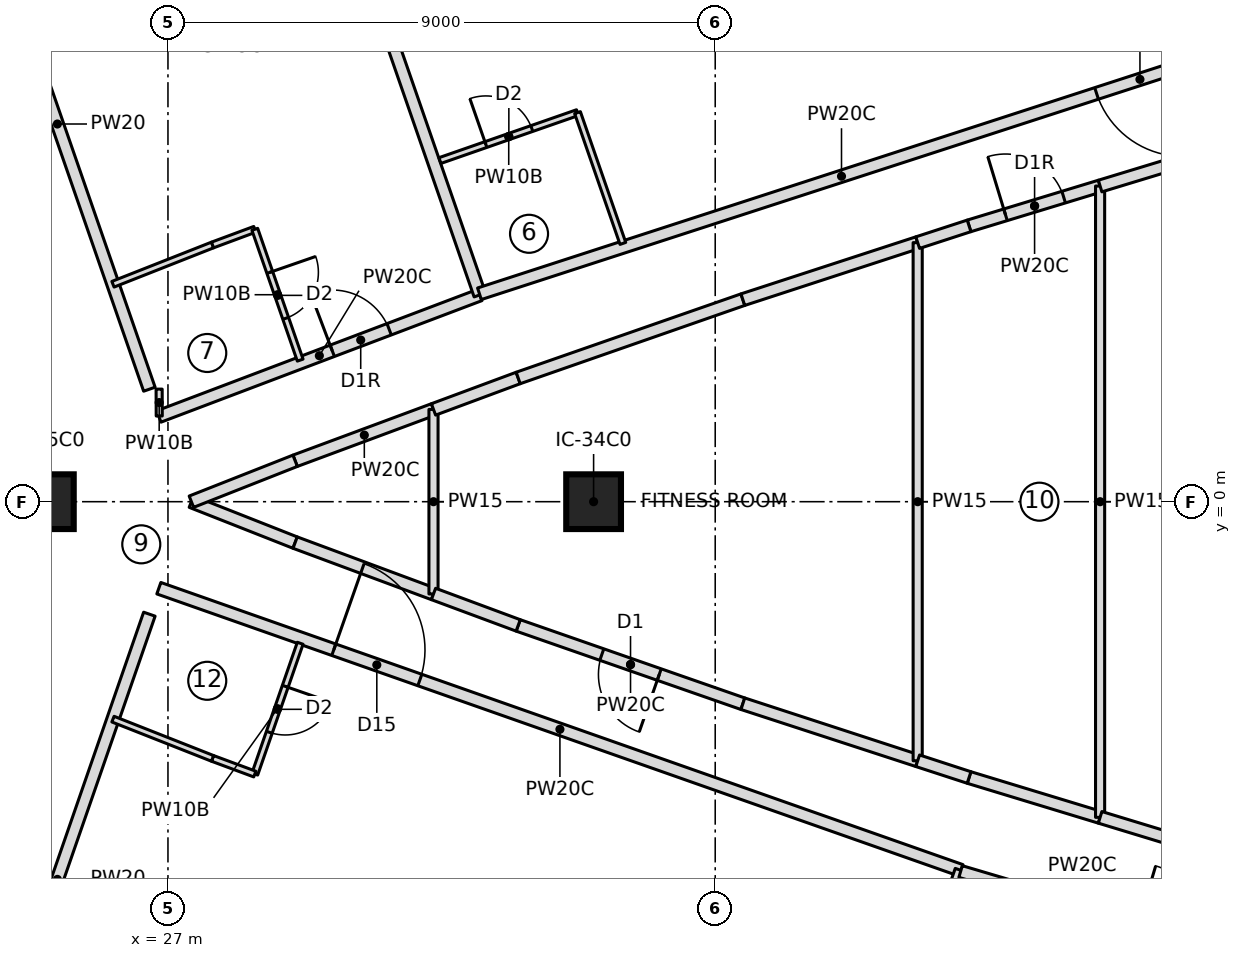
"""IFC4 building model, lengths in metres.
Left out: names, types, materials, properties, quantities, classifications, styles, units other than length and angle.
Written with IfcOpenShell. Run it as: python <this file> out.ifc"""

import sys

from ifc_helpers import new_model, si_unit, direction, frame, frame_2d, origin, origin_2d, place, context, subcontext, project, spatial, rectangle, extrude, element, fill, save


model = new_model("IFC4")
c1 = context("Model", 3, precision=1e-05, world=origin(), true_north=direction((0.0, 1.0)))
c2 = subcontext(c1, "Body", "Model", "MODEL_VIEW")
j1 = project(units=[si_unit("LENGTHUNIT", "METRE"), si_unit("PLANEANGLEUNIT", "RADIAN")], contexts=[c1])
p1 = place(None, origin())
s1 = spatial("IfcSite", under=j1, at=p1, CompositionType="ELEMENT")
p2 = place(p1, origin())
s2 = spatial("IfcBuilding", under=s1, at=p2, CompositionType="ELEMENT")
p3 = place(p2, frame((0.0, 0.0, 271.45)))
s3 = spatial("IfcBuildingStorey", under=s2, at=p3, CompositionType="ELEMENT", Elevation=271.45)
for number, where, z_axis, x_axis in (
    (1, (25.0, 0.0, 0.0), (0.0, 0.0, 1.0), (1.0, 0.0, 0.0)),
    (2, (34.0, 0.0, 0.0), (0.0, 0.0, 1.0), (1.0, 0.0, 0.0)),
):
    element("IfcColumn", number, at=place(p3, frame(where, z_axis=z_axis, x_axis=x_axis)), inside=s3, PredefinedType="COLUMN", context=c2, shape_type="SweptSolid", body=[
        extrude(rectangle(XDim=0.9, YDim=0.9, at=origin_2d()), origin(), (0.0, 0.0, 1.0), 3.55),
    ])
p4 = place(p3, frame((26.694, 1.85, 0.0), z_axis=(0.0, 0.0, 1.0), x_axis=(-0.327714422317, 0.944776829418, 0.0)))
e3 = element("IfcWall", 3, at=p4, inside=s3, PredefinedType="PARTITIONING", context=c2, shape_type="SweptSolid", body=[
    extrude(rectangle(XDim=9.233, YDim=0.2, at=frame_2d((4.617, 0.0))), origin(), (0.0, 0.0, 1.0), 3.25),
])
p5 = place(p3, frame((26.85, 1.401, 0.0), z_axis=(0.0, 0.0, 1.0), x_axis=(0.935181367748, 0.354169181912, 0.0)))
e4 = element("IfcWall", 4, at=p5, inside=s3, PredefinedType="PARTITIONING", context=c2, shape_type="SweptSolid", body=[
    extrude(rectangle(XDim=5.645, YDim=0.2, at=frame_2d((2.823, 0.0))), origin(), (0.0, 0.0, 1.0), 3.25),
])
p6 = place(p5, frame((3.05, 0.0, 0.0)))
e5 = element("IfcOpeningElement", 5, at=p6, cuts=e4, PredefinedType="OPENING", context=c2, shape_type="SweptSolid", body=[
    extrude(rectangle(XDim=1.0, YDim=2.1, at=frame_2d((0.5, 1.05))), frame((0.0, 0.11, 0.0), z_axis=(0.0, -1.0, 0.0), x_axis=(1.0, 0.0, 0.0)), (0.0, 0.0, 1.0), 0.22),
])
p7 = place(p3, frame((26.096, 3.576, 0.0), z_axis=(0.0, 0.0, 1.0), x_axis=(0.930254925629, 0.366913850028, 0.0)))
e6 = element("IfcWall", 6, at=p7, inside=s3, PredefinedType="PARTITIONING", context=c2, shape_type="SweptSolid", body=[
    extrude(rectangle(XDim=1.76, YDim=0.1, at=frame_2d((0.88, 0.0))), origin(), (0.0, 0.0, 1.0), 3.25),
])
p8 = place(p3, frame((27.733, 4.222, 0.0), z_axis=(0.0, 0.0, 1.0), x_axis=(0.937514267289, 0.347946833049, 0.0)))
e7 = element("IfcWall", 7, at=p8, inside=s3, PredefinedType="PARTITIONING", context=c2, shape_type="SweptSolid", body=[
    extrude(rectangle(XDim=0.742, YDim=0.1, at=frame_2d((0.371, 0.0))), origin(), (0.0, 0.0, 1.0), 3.25),
])
p9 = place(p3, frame((28.428, 4.48, 0.0), z_axis=(0.0, 0.0, 1.0), x_axis=(0.327718024288, -0.944775579996, 0.0)))
e8 = element("IfcWall", 8, at=p9, inside=s3, PredefinedType="PARTITIONING", context=c2, shape_type="SweptSolid", body=[
    extrude(rectangle(XDim=2.277, YDim=0.1, at=frame_2d((1.139, 0.0))), origin(), (0.0, 0.0, 1.0), 3.25),
])
p10 = place(p9, frame((0.75, 0.0, 0.0)))
e9 = element("IfcOpeningElement", 9, at=p10, cuts=e8, PredefinedType="OPENING", context=c2, shape_type="SweptSolid", body=[
    extrude(rectangle(XDim=0.8, YDim=2.1, at=frame_2d((0.4, 1.05))), frame((0.0, 0.06, 0.0), z_axis=(0.0, -1.0, 0.0), x_axis=(1.0, 0.0, 0.0)), (0.0, 0.0, 1.0), 0.12),
])
p11 = place(p3, frame((32.129, 3.401, 0.0), z_axis=(0.0, 0.0, 1.0), x_axis=(-0.327724115377, 0.944773467134, 0.0)))
e10 = element("IfcWall", 10, at=p11, inside=s3, PredefinedType="PARTITIONING", context=c2, shape_type="SweptSolid", body=[
    extrude(rectangle(XDim=9.702, YDim=0.2, at=frame_2d((4.851, 0.0))), origin(), (0.0, 0.0, 1.0), 3.25),
])
p12 = place(p3, frame((44.031, 7.286, 0.0), z_axis=(0.0, 0.0, 1.0), x_axis=(-0.951130603276, -0.308788885019, 0.0)))
e11 = element("IfcWall", 11, at=p12, inside=s3, PredefinedType="PARTITIONING", context=c2, shape_type="SweptSolid", body=[
    extrude(rectangle(XDim=12.521, YDim=0.2, at=frame_2d((6.26, 0.0))), origin(), (0.0, 0.0, 1.0), 3.25),
])
p13 = place(p12, frame((0.35, 0.0, 0.0)))
e12 = element("IfcOpeningElement", 12, at=p13, cuts=e11, PredefinedType="OPENING", context=c2, shape_type="SweptSolid", body=[
    extrude(rectangle(XDim=1.5, YDim=2.1, at=frame_2d((0.75, 1.05))), frame((0.0, 0.11, 0.0), z_axis=(0.0, -1.0, 0.0), x_axis=(1.0, 0.0, 0.0)), (0.0, 0.0, 1.0), 0.22),
])
p14 = place(p3, frame((31.473, 5.611, 0.0), z_axis=(0.0, 0.0, 1.0), x_axis=(0.944305532659, 0.329069994059, 0.0)))
e13 = element("IfcWall", 13, at=p14, inside=s3, PredefinedType="PARTITIONING", context=c2, shape_type="SweptSolid", body=[
    extrude(rectangle(XDim=2.396, YDim=0.1, at=frame_2d((1.198, 0.0))), origin(), (0.0, 0.0, 1.0), 3.25),
])
p15 = place(p14, frame((0.8, 0.0, 0.0)))
e14 = element("IfcOpeningElement", 14, at=p15, cuts=e13, PredefinedType="OPENING", context=c2, shape_type="SweptSolid", body=[
    extrude(rectangle(XDim=0.8, YDim=2.1, at=frame_2d((0.4, 1.05))), frame((0.0, 0.06, 0.0), z_axis=(0.0, -1.0, 0.0), x_axis=(1.0, 0.0, 0.0)), (0.0, 0.0, 1.0), 0.12),
])
p16 = place(p3, frame((33.735, 6.399, 0.0), z_axis=(0.0, 0.0, 1.0), x_axis=(0.32768871219, -0.944785747089, 0.0)))
e15 = element("IfcWall", 15, at=p16, inside=s3, PredefinedType="PARTITIONING", context=c2, shape_type="SweptSolid", body=[
    extrude(rectangle(XDim=2.277, YDim=0.1, at=frame_2d((1.138, 0.0))), origin(), (0.0, 0.0, 1.0), 3.25),
])
p17 = place(p3, frame((44.038, 7.267, 0.0), z_axis=(0.0, 0.0, 1.0), x_axis=(-0.327714576096, 0.944776776077, 0.0)))
e16 = element("IfcWall", 16, at=p17, inside=s3, PredefinedType="PARTITIONING", context=c2, shape_type="SweptSolid", body=[
    extrude(rectangle(XDim=9.717, YDim=0.2, at=frame_2d((4.858, 0.0))), origin(), (0.0, 0.0, 1.0), 3.25),
])
p18 = place(p3, frame((23.668, -10.573, 0.0), z_axis=(0.0, 0.0, 1.0), x_axis=(0.327714422317, 0.944776829418, 0.0)))
e17 = element("IfcWall", 17, at=p18, inside=s3, PredefinedType="PARTITIONING", context=c2, shape_type="SweptSolid", body=[
    extrude(rectangle(XDim=9.233, YDim=0.2, at=frame_2d((4.617, 0.0))), origin(), (0.0, 0.0, 1.0), 3.25),
])
p19 = place(p3, frame((26.85, -1.423, 0.0), z_axis=(0.0, 0.0, 1.0), x_axis=(0.943328585164, -0.331860182022, 0.0)))
e18 = element("IfcWall", 18, at=p19, inside=s3, PredefinedType="PARTITIONING", context=c2, shape_type="SweptSolid", body=[
    extrude(rectangle(XDim=13.984, YDim=0.2, at=frame_2d((6.992, 0.0))), origin(), (0.0, 0.0, 1.0), 3.25),
])
p20 = place(p19, frame((3.05, 0.0, 0.0)))
e19 = element("IfcOpeningElement", 19, at=p20, cuts=e18, PredefinedType="OPENING", context=c2, shape_type="SweptSolid", body=[
    extrude(rectangle(XDim=1.5, YDim=2.1, at=frame_2d((0.75, 1.05))), frame((0.0, 0.11, 0.0), z_axis=(0.0, -1.0, 0.0), x_axis=(1.0, 0.0, 0.0)), (0.0, 0.0, 1.0), 0.22),
])
p21 = place(p3, frame((29.175, -2.328, 0.0), z_axis=(0.0, 0.0, 1.0), x_axis=(-0.327718024288, -0.944775579996, 0.0)))
e20 = element("IfcWall", 20, at=p21, inside=s3, PredefinedType="PARTITIONING", context=c2, shape_type="SweptSolid", body=[
    extrude(rectangle(XDim=2.277, YDim=0.1, at=frame_2d((1.139, 0.0))), origin(), (0.0, 0.0, 1.0), 3.25),
])
p22 = place(p21, frame((0.75, 0.0, 0.0)))
e21 = element("IfcOpeningElement", 21, at=p22, cuts=e20, PredefinedType="OPENING", context=c2, shape_type="SweptSolid", body=[
    extrude(rectangle(XDim=0.8, YDim=2.1, at=frame_2d((0.4, 1.05))), frame((0.0, 0.06, 0.0), z_axis=(0.0, -1.0, 0.0), x_axis=(1.0, 0.0, 0.0)), (0.0, 0.0, 1.0), 0.12),
])
p23 = place(p3, frame((28.428, -4.48, 0.0), z_axis=(0.0, 0.0, 1.0), x_axis=(-0.937514267289, 0.347946833049, 0.0)))
e22 = element("IfcWall", 22, at=p23, inside=s3, PredefinedType="PARTITIONING", context=c2, shape_type="SweptSolid", body=[
    extrude(rectangle(XDim=0.742, YDim=0.1, at=frame_2d((0.371, 0.0))), origin(), (0.0, 0.0, 1.0), 3.25),
])
p24 = place(p3, frame((27.733, -4.222, 0.0), z_axis=(0.0, 0.0, 1.0), x_axis=(-0.930254925629, 0.366913850028, 0.0)))
e23 = element("IfcWall", 23, at=p24, inside=s3, PredefinedType="PARTITIONING", context=c2, shape_type="SweptSolid", body=[
    extrude(rectangle(XDim=1.76, YDim=0.1, at=frame_2d((0.88, 0.0))), origin(), (0.0, 0.0, 1.0), 3.25),
])
p25 = place(p3, frame((36.861, -15.235, 0.0), z_axis=(0.0, 0.0, 1.0), x_axis=(0.327710853631, 0.944778067279, 0.0)))
e24 = element("IfcWall", 24, at=p25, inside=s3, PredefinedType="PARTITIONING", context=c2, shape_type="SweptSolid", body=[
    extrude(rectangle(XDim=9.707, YDim=0.2, at=frame_2d((4.854, 0.0))), origin(), (0.0, 0.0, 1.0), 3.25),
])
p26 = place(p3, frame((40.035, -6.083, 0.0), z_axis=(0.0, 0.0, 1.0), x_axis=(0.958901312153, -0.283739799027, 0.0)))
e25 = element("IfcWall", 25, at=p26, inside=s3, PredefinedType="PARTITIONING", context=c2, shape_type="SweptSolid", body=[
    extrude(rectangle(XDim=4.174, YDim=0.2, at=frame_2d((2.087, 0.0))), origin(), (0.0, 0.0, 1.0), 3.25),
])
p27 = place(p26, frame((3.05, 0.0, 0.0)))
e26 = element("IfcOpeningElement", 26, at=p27, cuts=e25, PredefinedType="OPENING", context=c2, shape_type="SweptSolid", body=[
    extrude(rectangle(XDim=1.0, YDim=2.1, at=frame_2d((0.5, 1.05))), frame((0.0, 0.11, 0.0), z_axis=(0.0, -1.0, 0.0), x_axis=(1.0, 0.0, 0.0)), (0.0, 0.0, 1.0), 0.22),
])
p28 = place(p3, frame((29.092, 0.673, 0.0), z_axis=(0.0, 0.0, 1.0), x_axis=(0.937481542944, 0.348034993411, 0.0)))
e27 = element("IfcWall", 27, at=p28, inside=s3, PredefinedType="PARTITIONING", context=c2, shape_type="SweptSolid", body=[
    extrude(rectangle(XDim=2.427, YDim=0.2, at=frame_2d((1.214, 0.0))), origin(), (0.0, 0.0, 1.0), 3.25),
])
for number, where, z_axis, x_axis in (
    (28, (29.092, -0.673, 0.0), (0.0, 0.0, 1.0), (-0.93, 0.367, 0.0)),
    (29, (27.385, 0.0, 0.0), (0.0, 0.0, 1.0), (0.93, 0.367, 0.0)),
):
    element("IfcWall", number, at=place(p3, frame(where, z_axis=z_axis, x_axis=x_axis)), inside=s3, PredefinedType="PARTITIONING", context=c2, shape_type="SweptSolid", body=[
        extrude(rectangle(XDim=1.834, YDim=0.2, at=frame_2d((0.917, 0.0))), origin(), (0.0, 0.0, 1.0), 3.25),
    ])
p29 = place(p3, frame((31.367, -1.518, 0.0), z_axis=(0.0, 0.0, 1.0), x_axis=(-0.937481542944, 0.348034993411, 0.0)))
e30 = element("IfcWall", 30, at=p29, inside=s3, PredefinedType="PARTITIONING", context=c2, shape_type="SweptSolid", body=[
    extrude(rectangle(XDim=2.427, YDim=0.2, at=frame_2d((1.214, 0.0))), origin(), (0.0, 0.0, 1.0), 3.25),
])
p30 = place(p3, frame((31.367, -1.518, 0.0), z_axis=(0.0, 0.0, 1.0), x_axis=(0.0, 1.0, 0.0)))
e31 = element("IfcWall", 31, at=p30, inside=s3, PredefinedType="PARTITIONING", context=c2, shape_type="SweptSolid", body=[
    extrude(rectangle(XDim=3.035, YDim=0.15, at=frame_2d((1.518, 0.0))), origin(), (0.0, 0.0, 1.0), 3.25),
])
p31 = place(p3, frame((36.455, -3.323, 0.0), z_axis=(0.0, 0.0, 1.0), x_axis=(-0.944283635062, 0.329132825093, 0.0)))
e32 = element("IfcWall", 32, at=p31, inside=s3, PredefinedType="PARTITIONING", context=c2, shape_type="SweptSolid", body=[
    extrude(rectangle(XDim=3.913, YDim=0.2, at=frame_2d((1.957, 0.0))), origin(), (0.0, 0.0, 1.0), 3.25),
])
p32 = place(p31, frame((1.457, 0.0, 0.0)))
e33 = element("IfcOpeningElement", 33, at=p32, cuts=e32, PredefinedType="OPENING", context=c2, shape_type="SweptSolid", body=[
    extrude(rectangle(XDim=1.0, YDim=2.1, at=frame_2d((0.5, 1.05))), frame((0.0, 0.11, 0.0), z_axis=(0.0, -1.0, 0.0), x_axis=(1.0, 0.0, 0.0)), (0.0, 0.0, 1.0), 0.22),
])
p33 = place(p3, frame((39.33, -4.26, 0.0), z_axis=(0.0, 0.0, 1.0), x_axis=(-0.95070604111, 0.310093572003, 0.0)))
e34 = element("IfcWall", 34, at=p33, inside=s3, PredefinedType="PARTITIONING", context=c2, shape_type="SweptSolid", body=[
    extrude(rectangle(XDim=3.024, YDim=0.2, at=frame_2d((1.512, 0.0))), origin(), (0.0, 0.0, 1.0), 3.25),
])
for number, where, z_axis, x_axis in (
    (35, (32.76, -2.035, 0.0), (0.0, 0.0, 1.0), (-0.937, 0.348, 0.0)),
    (36, (31.367, 1.518, 0.0), (0.0, 0.0, 1.0), (0.937, 0.348, 0.0)),
):
    element("IfcWall", number, at=place(p3, frame(where, z_axis=z_axis, x_axis=x_axis)), inside=s3, PredefinedType="PARTITIONING", context=c2, shape_type="SweptSolid", body=[
        extrude(rectangle(XDim=1.486, YDim=0.2, at=frame_2d((0.743, 0.0))), origin(), (0.0, 0.0, 1.0), 3.25),
    ])
p34 = place(p3, frame((32.76, 2.035, 0.0), z_axis=(0.0, 0.0, 1.0), x_axis=(0.944283635062, 0.329132825093, 0.0)))
e37 = element("IfcWall", 37, at=p34, inside=s3, PredefinedType="PARTITIONING", context=c2, shape_type="SweptSolid", body=[
    extrude(rectangle(XDim=3.913, YDim=0.2, at=frame_2d((1.957, 0.0))), origin(), (0.0, 0.0, 1.0), 3.25),
])
p35 = place(p3, frame((36.455, 3.323, 0.0), z_axis=(0.0, 0.0, 1.0), x_axis=(0.95070604111, 0.310093572003, 0.0)))
e38 = element("IfcWall", 38, at=p35, inside=s3, PredefinedType="PARTITIONING", context=c2, shape_type="SweptSolid", body=[
    extrude(rectangle(XDim=3.024, YDim=0.2, at=frame_2d((1.512, 0.0))), origin(), (0.0, 0.0, 1.0), 3.25),
])
p36 = place(p3, frame((39.33, -4.26, 0.0), z_axis=(0.0, 0.0, 1.0), x_axis=(0.0, 1.0, 0.0)))
e39 = element("IfcWall", 39, at=p36, inside=s3, PredefinedType="PARTITIONING", context=c2, shape_type="SweptSolid", body=[
    extrude(rectangle(XDim=8.521, YDim=0.15, at=frame_2d((4.26, 0.0))), origin(), (0.0, 0.0, 1.0), 3.25),
])
p37 = place(p3, frame((40.175, 4.536, 0.0), z_axis=(0.0, 0.0, 1.0), x_axis=(0.956739496331, 0.290945933396, 0.0)))
e40 = element("IfcWall", 40, at=p37, inside=s3, PredefinedType="PARTITIONING", context=c2, shape_type="SweptSolid", body=[
    extrude(rectangle(XDim=2.252, YDim=0.2, at=frame_2d((1.126, 0.0))), origin(), (0.0, 0.0, 1.0), 3.25),
])
p38 = place(p37, frame((0.626, 0.0, 0.0)))
e41 = element("IfcOpeningElement", 41, at=p38, cuts=e40, PredefinedType="OPENING", context=c2, shape_type="SweptSolid", body=[
    extrude(rectangle(XDim=1.0, YDim=2.1, at=frame_2d((0.5, 1.05))), frame((0.0, 0.11, 0.0), z_axis=(0.0, -1.0, 0.0), x_axis=(1.0, 0.0, 0.0)), (0.0, 0.0, 1.0), 0.22),
])
p39 = place(p3, frame((42.33, -5.191, 0.0), z_axis=(0.0, 0.0, 1.0), x_axis=(-0.956739496331, 0.290945933396, 0.0)))
e42 = element("IfcWall", 42, at=p39, inside=s3, PredefinedType="PARTITIONING", context=c2, shape_type="SweptSolid", body=[
    extrude(rectangle(XDim=2.252, YDim=0.2, at=frame_2d((1.126, 0.0))), origin(), (0.0, 0.0, 1.0), 3.25),
])
for number, where, z_axis, x_axis in (
    (43, (40.175, -4.536, 0.0), (0.0, 0.0, 1.0), (-0.951, 0.31, 0.0)),
    (44, (39.33, 4.26, 0.0), (0.0, 0.0, 1.0), (0.951, 0.31, 0.0)),
):
    element("IfcWall", number, at=place(p3, frame(where, z_axis=z_axis, x_axis=x_axis)), inside=s3, PredefinedType="PARTITIONING", context=c2, shape_type="SweptSolid", body=[
        extrude(rectangle(XDim=0.889, YDim=0.2, at=frame_2d((0.444, 0.0))), origin(), (0.0, 0.0, 1.0), 3.25),
    ])
p40 = place(p3, frame((42.33, -5.191, 0.0), z_axis=(0.0, 0.0, 1.0), x_axis=(0.0, 1.0, 0.0)))
e45 = element("IfcWall", 45, at=p40, inside=s3, PredefinedType="PARTITIONING", context=c2, shape_type="SweptSolid", body=[
    extrude(rectangle(XDim=10.383, YDim=0.15, at=frame_2d((5.191, 0.0))), origin(), (0.0, 0.0, 1.0), 3.25),
])
for number, where, z_axis, x_axis in (
    (46, (43.918, -5.675, 0.0), (0.0, 0.0, 1.0), (-0.957, 0.291, 0.0)),
    (47, (42.33, 5.191, 0.0), (0.0, 0.0, 1.0), (0.957, 0.291, 0.0)),
):
    element("IfcWall", number, at=place(p3, frame(where, z_axis=z_axis, x_axis=x_axis)), inside=s3, PredefinedType="PARTITIONING", context=c2, shape_type="SweptSolid", body=[
        extrude(rectangle(XDim=1.661, YDim=0.2, at=frame_2d((0.831, 0.0))), origin(), (0.0, 0.0, 1.0), 3.25),
    ])
p41 = place(p3, frame((26.856, 1.409, 0.0), z_axis=(0.0, 0.0, 1.0), x_axis=(-0.003863105832, 0.999992538179, 0.0)))
e48 = element("IfcWall", 48, at=p41, inside=s3, PredefinedType="PARTITIONING", context=c2, shape_type="SweptSolid", body=[
    extrude(rectangle(XDim=0.442, YDim=0.1, at=frame_2d((0.221, 0.0))), origin(), (0.0, 0.0, 1.0), 3.25),
])
p42 = place(p10, origin())
e49 = element("IfcDoor", 49, at=p42, inside=s3, OperationType="SINGLE_SWING_LEFT", PredefinedType="DOOR", context=c2, shape_type="SweptSolid", body=[
    extrude(rectangle(XDim=0.8, YDim=2.1, at=frame_2d((0.4, 1.05))), frame((0.0, 0.025, 0.0), z_axis=(0.0, -1.0, 0.0), x_axis=(1.0, 0.0, 0.0)), (0.0, 0.0, 1.0), 0.05),
])
fill(e9, e49)
p43 = place(p6, origin())
e50 = element("IfcDoor", 50, at=p43, inside=s3, OperationType="SINGLE_SWING_RIGHT", PredefinedType="DOOR", context=c2, shape_type="SweptSolid", body=[
    extrude(rectangle(XDim=1.0, YDim=2.1, at=frame_2d((0.5, 1.05))), frame((0.0, 0.025, 0.0), z_axis=(0.0, -1.0, 0.0), x_axis=(1.0, 0.0, 0.0)), (0.0, 0.0, 1.0), 0.05),
])
fill(e5, e50)
p44 = place(p15, origin())
e51 = element("IfcDoor", 51, at=p44, inside=s3, OperationType="SINGLE_SWING_LEFT", PredefinedType="DOOR", context=c2, shape_type="SweptSolid", body=[
    extrude(rectangle(XDim=0.8, YDim=2.1, at=frame_2d((0.4, 1.05))), frame((0.0, 0.025, 0.0), z_axis=(0.0, -1.0, 0.0), x_axis=(1.0, 0.0, 0.0)), (0.0, 0.0, 1.0), 0.05),
])
fill(e14, e51)
p45 = place(p13, origin())
e52 = element("IfcDoor", 52, at=p45, inside=s3, OperationType="DOUBLE_DOOR_SINGLE_SWING", PredefinedType="DOOR", context=c2, shape_type="SweptSolid", body=[
    extrude(rectangle(XDim=1.5, YDim=2.1, at=frame_2d((0.75, 1.05))), frame((0.0, 0.025, 0.0), z_axis=(0.0, -1.0, 0.0), x_axis=(1.0, 0.0, 0.0)), (0.0, 0.0, 1.0), 0.05),
])
fill(e12, e52)
p46 = place(p22, origin())
e53 = element("IfcDoor", 53, at=p46, inside=s3, OperationType="SINGLE_SWING_LEFT", PredefinedType="DOOR", context=c2, shape_type="SweptSolid", body=[
    extrude(rectangle(XDim=0.8, YDim=2.1, at=frame_2d((0.4, 1.05))), frame((0.0, 0.025, 0.0), z_axis=(0.0, -1.0, 0.0), x_axis=(1.0, 0.0, 0.0)), (0.0, 0.0, 1.0), 0.05),
])
fill(e21, e53)
p47 = place(p20, origin())
e54 = element("IfcDoor", 54, at=p47, inside=s3, OperationType="DOUBLE_DOOR_SINGLE_SWING", PredefinedType="DOOR", context=c2, shape_type="SweptSolid", body=[
    extrude(rectangle(XDim=1.5, YDim=2.1, at=frame_2d((0.75, 1.05))), frame((0.0, 0.025, 0.0), z_axis=(0.0, -1.0, 0.0), x_axis=(1.0, 0.0, 0.0)), (0.0, 0.0, 1.0), 0.05),
])
fill(e19, e54)
p48 = place(p32, origin())
e55 = element("IfcDoor", 55, at=p48, inside=s3, OperationType="SINGLE_SWING_LEFT", PredefinedType="DOOR", context=c2, shape_type="SweptSolid", body=[
    extrude(rectangle(XDim=1.0, YDim=2.1, at=frame_2d((0.5, 1.05))), frame((0.0, 0.025, 0.0), z_axis=(0.0, -1.0, 0.0), x_axis=(1.0, 0.0, 0.0)), (0.0, 0.0, 1.0), 0.05),
])
fill(e33, e55)
p49 = place(p38, origin())
e56 = element("IfcDoor", 56, at=p49, inside=s3, OperationType="SINGLE_SWING_RIGHT", PredefinedType="DOOR", context=c2, shape_type="SweptSolid", body=[
    extrude(rectangle(XDim=1.0, YDim=2.1, at=frame_2d((0.5, 1.05))), frame((0.0, 0.025, 0.0), z_axis=(0.0, -1.0, 0.0), x_axis=(1.0, 0.0, 0.0)), (0.0, 0.0, 1.0), 0.05),
])
fill(e41, e56)
save(model, sys.argv[1])
